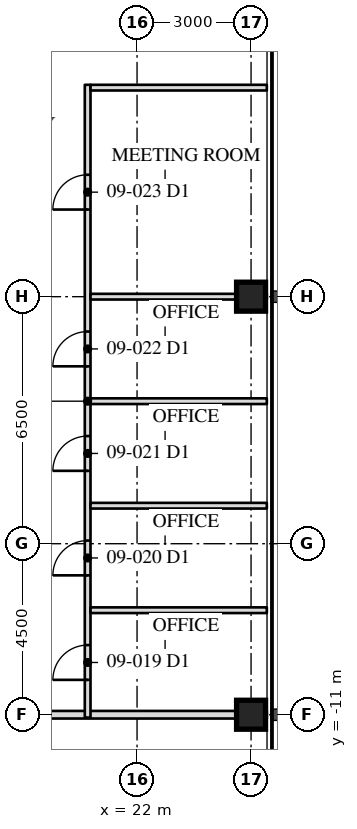
"""IFC4 building model, lengths in metres.
Left out: names, types, materials, properties, quantities, classifications, styles, units other than length and angle.
Written with IfcOpenShell. Run it as: python <this file> out.ifc"""

import sys

from ifc_helpers import new_model, si_unit, direction, frame, frame_2d, origin, origin_2d, place, context, subcontext, project, spatial, rectangle, hollow_rectangle, extrude, element, fill, save


model = new_model("IFC4")
c1 = context("Model", 3, precision=1e-05, world=origin(), true_north=direction((0.0, 1.0)))
c2 = subcontext(c1, "Body", "Model", "MODEL_VIEW")
j1 = project(units=[si_unit("LENGTHUNIT", "METRE"), si_unit("PLANEANGLEUNIT", "RADIAN")], contexts=[c1])
p1 = place(None, origin())
s1 = spatial("IfcSite", under=j1, at=p1, CompositionType="ELEMENT")
p2 = place(p1, origin())
s2 = spatial("IfcBuilding", under=s1, at=p2, CompositionType="ELEMENT")
p3 = place(p2, frame((0.0, 0.0, 40.6)))
s3 = spatial("IfcBuildingStorey", under=s2, at=p3, CompositionType="ELEMENT", Elevation=40.6)
for number, where, z_axis, x_axis in (
    (1, (25.0, -11.0, 0.0), (0.0, 0.0, 1.0), (0.0, 1.0, 0.0)),
    (2, (25.0, 0.0, 0.0), (0.0, 0.0, 1.0), (0.0, 1.0, 0.0)),
):
    element("IfcColumn", number, at=place(p3, frame(where, z_axis=z_axis, x_axis=x_axis)), inside=s3, PredefinedType="COLUMN", context=c2, shape_type="SweptSolid", body=[
        extrude(hollow_rectangle(XDim=0.762, YDim=0.762, WallThickness=0.127, at=origin_2d()), origin(), (0.0, 0.0, 1.0), 4.1),
    ])
p4 = place(p3, frame((13.85, -11.0, 0.0), z_axis=(0.0, 0.0, 1.0), x_axis=(1.0, 0.0, 0.0)))
e3 = element("IfcWall", 3, at=p4, inside=s3, PredefinedType="PARTITIONING", context=c2, shape_type="SweptSolid", body=[
    extrude(rectangle(XDim=11.565, YDim=0.2, at=frame_2d((5.782, 0.0))), origin(), (0.0, 0.0, 1.0), 3.13),
])
p5 = place(p3, frame((20.7, -11.075, 0.0), z_axis=(0.0, 0.0, 1.0), x_axis=(0.0, 1.0, 0.0)))
e4 = element("IfcWall", 4, at=p5, inside=s3, PredefinedType="PARTITIONING", context=c2, shape_type="SweptSolid", body=[
    extrude(rectangle(XDim=16.65, YDim=0.15, at=frame_2d((8.325, 0.0))), origin(), (0.0, 0.0, 1.0), 3.91),
])
p6 = place(p5, frame((0.992, 0.0, 0.0)))
e5 = element("IfcOpeningElement", 5, at=p6, cuts=e4, PredefinedType="OPENING", context=c2, shape_type="SweptSolid", body=[
    extrude(rectangle(XDim=0.915, YDim=2.134, at=frame_2d((0.458, 1.067))), frame((0.0, 0.085, 0.0), z_axis=(0.0, -1.0, 0.0), x_axis=(1.0, 0.0, 0.0)), (0.0, 0.0, 1.0), 0.17),
])
p7 = place(p5, frame((3.742, 0.0, 0.0)))
e6 = element("IfcOpeningElement", 6, at=p7, cuts=e4, PredefinedType="OPENING", context=c2, shape_type="SweptSolid", body=[
    extrude(rectangle(XDim=0.915, YDim=2.134, at=frame_2d((0.458, 1.067))), frame((0.0, 0.085, 0.0), z_axis=(0.0, -1.0, 0.0), x_axis=(1.0, 0.0, 0.0)), (0.0, 0.0, 1.0), 0.17),
])
p8 = place(p5, frame((6.492, 0.0, 0.0)))
e7 = element("IfcOpeningElement", 7, at=p8, cuts=e4, PredefinedType="OPENING", context=c2, shape_type="SweptSolid", body=[
    extrude(rectangle(XDim=0.915, YDim=2.134, at=frame_2d((0.458, 1.067))), frame((0.0, 0.085, 0.0), z_axis=(0.0, -1.0, 0.0), x_axis=(1.0, 0.0, 0.0)), (0.0, 0.0, 1.0), 0.17),
])
p9 = place(p5, frame((9.242, 0.0, 0.0)))
e8 = element("IfcOpeningElement", 8, at=p9, cuts=e4, PredefinedType="OPENING", context=c2, shape_type="SweptSolid", body=[
    extrude(rectangle(XDim=0.915, YDim=2.134, at=frame_2d((0.458, 1.067))), frame((0.0, 0.085, 0.0), z_axis=(0.0, -1.0, 0.0), x_axis=(1.0, 0.0, 0.0)), (0.0, 0.0, 1.0), 0.17),
])
p10 = place(p5, frame((13.367, 0.0, 0.0)))
e9 = element("IfcOpeningElement", 9, at=p10, cuts=e4, PredefinedType="OPENING", context=c2, shape_type="SweptSolid", body=[
    extrude(rectangle(XDim=0.915, YDim=2.134, at=frame_2d((0.458, 1.067))), frame((0.0, 0.085, 0.0), z_axis=(0.0, -1.0, 0.0), x_axis=(1.0, 0.0, 0.0)), (0.0, 0.0, 1.0), 0.17),
])
for number, where, z_axis, x_axis in (
    (10, (20.775, -8.25, 0.0), (0.0, 0.0, 1.0), (1.0, 0.0, 0.0)),
    (11, (20.775, -5.5, 0.0), (0.0, 0.0, 1.0), (1.0, 0.0, 0.0)),
    (12, (20.775, -2.75, 0.0), (0.0, 0.0, 1.0), (1.0, 0.0, 0.0)),
):
    element("IfcWall", number, at=place(p3, frame(where, z_axis=z_axis, x_axis=x_axis)), inside=s3, PredefinedType="PARTITIONING", context=c2, shape_type="SweptSolid", body=[
        extrude(rectangle(XDim=4.64, YDim=0.15, at=frame_2d((2.32, 0.0))), origin(), (0.0, 0.0, 1.0), 3.91),
    ])
p11 = place(p3, frame((20.775, 0.0, 0.0), z_axis=(0.0, 0.0, 1.0), x_axis=(1.0, 0.0, 0.0)))
e13 = element("IfcWall", 13, at=p11, inside=s3, PredefinedType="PARTITIONING", context=c2, shape_type="SweptSolid", body=[
    extrude(rectangle(XDim=4.64, YDim=0.15, at=frame_2d((2.32, 0.0))), origin(), (0.0, 0.0, 1.0), 3.13),
])
p12 = place(p3, frame((20.775, 5.5, 0.0), z_axis=(0.0, 0.0, 1.0), x_axis=(1.0, 0.0, 0.0)))
e14 = element("IfcWall", 14, at=p12, inside=s3, PredefinedType="PARTITIONING", context=c2, shape_type="SweptSolid", body=[
    extrude(rectangle(XDim=4.64, YDim=0.15, at=frame_2d((2.32, 0.0))), origin(), (0.0, 0.0, 1.0), 3.91),
])
p13 = place(p6, origin())
e15 = element("IfcDoor", 15, at=p13, inside=s3, OperationType="SINGLE_SWING_LEFT", PredefinedType="DOOR", context=c2, shape_type="SweptSolid", body=[
    extrude(rectangle(XDim=0.915, YDim=2.134, at=frame_2d((0.458, 1.067))), frame((0.0, 0.025, 0.0), z_axis=(0.0, -1.0, 0.0), x_axis=(1.0, 0.0, 0.0)), (0.0, 0.0, 1.0), 0.05),
])
fill(e5, e15)
p14 = place(p7, origin())
e16 = element("IfcDoor", 16, at=p14, inside=s3, OperationType="SINGLE_SWING_LEFT", PredefinedType="DOOR", context=c2, shape_type="SweptSolid", body=[
    extrude(rectangle(XDim=0.915, YDim=2.134, at=frame_2d((0.458, 1.067))), frame((0.0, 0.025, 0.0), z_axis=(0.0, -1.0, 0.0), x_axis=(1.0, 0.0, 0.0)), (0.0, 0.0, 1.0), 0.05),
])
fill(e6, e16)
p15 = place(p8, origin())
e17 = element("IfcDoor", 17, at=p15, inside=s3, OperationType="SINGLE_SWING_LEFT", PredefinedType="DOOR", context=c2, shape_type="SweptSolid", body=[
    extrude(rectangle(XDim=0.915, YDim=2.134, at=frame_2d((0.458, 1.067))), frame((0.0, 0.025, 0.0), z_axis=(0.0, -1.0, 0.0), x_axis=(1.0, 0.0, 0.0)), (0.0, 0.0, 1.0), 0.05),
])
fill(e7, e17)
p16 = place(p9, origin())
e18 = element("IfcDoor", 18, at=p16, inside=s3, OperationType="SINGLE_SWING_LEFT", PredefinedType="DOOR", context=c2, shape_type="SweptSolid", body=[
    extrude(rectangle(XDim=0.915, YDim=2.134, at=frame_2d((0.458, 1.067))), frame((0.0, 0.025, 0.0), z_axis=(0.0, -1.0, 0.0), x_axis=(1.0, 0.0, 0.0)), (0.0, 0.0, 1.0), 0.05),
])
fill(e8, e18)
p17 = place(p10, origin())
e19 = element("IfcDoor", 19, at=p17, inside=s3, OperationType="SINGLE_SWING_LEFT", PredefinedType="DOOR", context=c2, shape_type="SweptSolid", body=[
    extrude(rectangle(XDim=0.915, YDim=2.134, at=frame_2d((0.458, 1.067))), frame((0.0, 0.025, 0.0), z_axis=(0.0, -1.0, 0.0), x_axis=(1.0, 0.0, 0.0)), (0.0, 0.0, 1.0), 0.05),
])
fill(e9, e19)
save(model, sys.argv[1])
